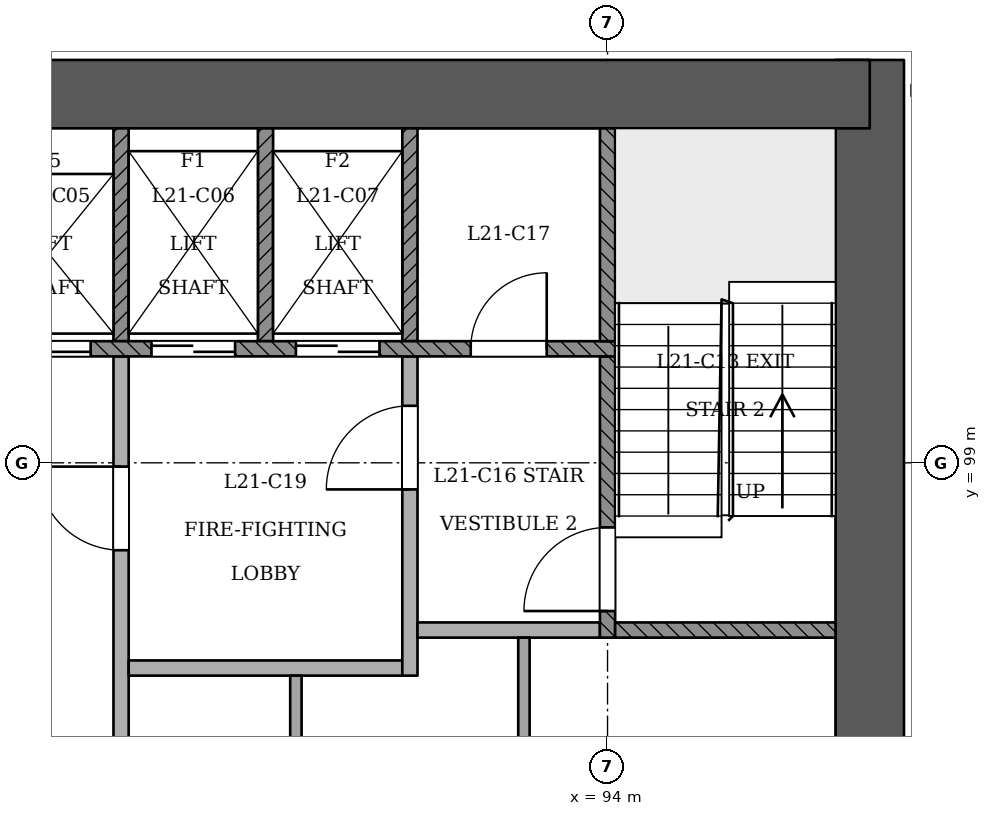
"""IFC4 building model, lengths in metres.
Left out: names, types, materials, properties, quantities, classifications, styles, units other than length and angle.
Written with IfcOpenShell. Run it as: python <this file> out.ifc"""

import sys

from ifc_helpers import new_model, si_unit, direction, frame, frame_2d, origin, place, context, subcontext, project, spatial, rectangle, extrude, element, fill, save


model = new_model("IFC4")
c1 = context("Model", 3, precision=1e-05, world=origin(), true_north=direction((0.0, 1.0)))
c2 = subcontext(c1, "Body", "Model", "MODEL_VIEW")
j1 = project(units=[si_unit("LENGTHUNIT", "METRE"), si_unit("PLANEANGLEUNIT", "RADIAN")], contexts=[c1])
p1 = place(None, origin())
s1 = spatial("IfcSite", under=j1, at=p1, CompositionType="ELEMENT")
p2 = place(p1, origin())
s2 = spatial("IfcBuilding", under=s1, at=p2, CompositionType="ELEMENT")
p3 = place(p2, frame((0.0, 0.0, 84.6)))
s3 = spatial("IfcBuildingStorey", under=s2, at=p3, CompositionType="ELEMENT", Elevation=84.6)
p4 = place(p3, frame((97.45, 92.95, 0.0), z_axis=(0.0, 0.0, 1.0), x_axis=(0.0, 1.0, 0.0)))
e1 = element("IfcWall", 1, at=p4, inside=s3, PredefinedType="SHEAR", context=c2, shape_type="SweptSolid", body=[
    extrude(rectangle(XDim=11.35, YDim=0.9, at=frame_2d((5.675, 0.0))), origin(), (0.0, 0.0, 1.0), 3.6),
])
p5 = place(p3, frame((97.45, 103.85, 0.0), z_axis=(0.0, 0.0, 1.0), x_axis=(-1.0, 0.0, 0.0)))
e2 = element("IfcWall", 2, at=p5, inside=s3, PredefinedType="SHEAR", context=c2, shape_type="SweptSolid", body=[
    extrude(rectangle(XDim=25.35, YDim=0.9, at=frame_2d((12.675, 0.0))), origin(), (0.0, 0.0, 1.0), 3.6),
])
p6 = place(p3, frame((85.631, 60.527, 0.0), z_axis=(0.0, 0.0, 1.0), x_axis=(0.500002601959, 0.866023901537, 0.0)))
e3 = element("IfcWall", 3, at=p6, inside=s3, PredefinedType="PARTITIONING", context=c2, shape_type="SweptSolid", body=[
    extrude(rectangle(XDim=41.892, YDim=0.15, at=frame_2d((20.946, 0.0))), origin(), (0.0, 0.0, 1.0), 2.7),
])
p7 = place(p6, frame((3.184, 0.0, 0.0)))
e4 = element("IfcOpeningElement", 4, at=p7, cuts=e3, PredefinedType="OPENING", context=c2, shape_type="SweptSolid", body=[
    extrude(rectangle(XDim=1.2, YDim=2.1, at=frame_2d((0.6, 1.05))), frame((0.0, 0.085, 0.0), z_axis=(0.0, -1.0, 0.0), x_axis=(1.0, 0.0, 0.0)), (0.0, 0.0, 1.0), 0.171),
])
p8 = place(p6, frame((10.688, 0.0, 0.0)))
e5 = element("IfcOpeningElement", 5, at=p8, cuts=e3, PredefinedType="OPENING", context=c2, shape_type="SweptSolid", body=[
    extrude(rectangle(XDim=1.0, YDim=2.1, at=frame_2d((0.5, 1.05))), frame((0.0, 0.085, 0.0), z_axis=(0.0, -1.0, 0.0), x_axis=(1.0, 0.0, 0.0)), (0.0, 0.0, 1.0), 0.171),
])
p9 = place(p6, frame((14.042, 0.0, 0.0)))
e6 = element("IfcOpeningElement", 6, at=p9, cuts=e3, PredefinedType="OPENING", context=c2, shape_type="SweptSolid", body=[
    extrude(rectangle(XDim=1.0, YDim=2.1, at=frame_2d((0.5, 1.05))), frame((0.0, 0.085, 0.0), z_axis=(0.0, -1.0, 0.0), x_axis=(1.0, 0.0, 0.0)), (0.0, 0.0, 1.0), 0.171),
])
p10 = place(p6, frame((19.688, 0.0, 0.0)))
e7 = element("IfcOpeningElement", 7, at=p10, cuts=e3, PredefinedType="OPENING", context=c2, shape_type="SweptSolid", body=[
    extrude(rectangle(XDim=1.0, YDim=2.1, at=frame_2d((0.5, 1.05))), frame((0.0, 0.085, 0.0), z_axis=(0.0, -1.0, 0.0), x_axis=(1.0, 0.0, 0.0)), (0.0, 0.0, 1.0), 0.171),
])
p11 = place(p6, frame((21.897, 0.0, 0.0)))
e8 = element("IfcOpeningElement", 8, at=p11, cuts=e3, PredefinedType="OPENING", context=c2, shape_type="SweptSolid", body=[
    extrude(rectangle(XDim=1.0, YDim=2.1, at=frame_2d((0.5, 1.05))), frame((0.0, 0.085, 0.0), z_axis=(0.0, -1.0, 0.0), x_axis=(1.0, 0.0, 0.0)), (0.0, 0.0, 1.0), 0.171),
])
p12 = place(p6, frame((28.572, 0.0, 0.0)))
e9 = element("IfcOpeningElement", 9, at=p12, cuts=e3, PredefinedType="OPENING", context=c2, shape_type="SweptSolid", body=[
    extrude(rectangle(XDim=1.0, YDim=2.1, at=frame_2d((0.5, 1.05))), frame((0.0, 0.085, 0.0), z_axis=(0.0, -1.0, 0.0), x_axis=(1.0, 0.0, 0.0)), (0.0, 0.0, 1.0), 0.171),
])
p13 = place(p6, frame((35.292, 0.0, 0.0)))
e10 = element("IfcOpeningElement", 10, at=p13, cuts=e3, PredefinedType="OPENING", context=c2, shape_type="SweptSolid", body=[
    extrude(rectangle(XDim=1.2, YDim=2.1, at=frame_2d((0.6, 1.05))), frame((0.0, 0.085, 0.0), z_axis=(0.0, -1.0, 0.0), x_axis=(1.0, 0.0, 0.0)), (0.0, 0.0, 1.0), 0.171),
])
p14 = place(p3, frame((99.492, 103.9, 0.0), z_axis=(0.0, 0.0, 1.0), x_axis=(-1.0, 0.0, 0.0)))
e11 = element("IfcWall", 11, at=p14, inside=s3, PredefinedType="PARTITIONING", context=c2, shape_type="SweptSolid", body=[
    extrude(rectangle(XDim=1.492, YDim=0.15, at=frame_2d((0.746, 0.0))), origin(), (0.0, 0.0, 1.0), 3.1),
])
p15 = place(p3, frame((87.6, 93.4, 0.0), z_axis=(0.0, 0.0, 1.0), x_axis=(0.0, 1.0, 0.0)))
e12 = element("IfcWall", 12, at=p15, inside=s3, PredefinedType="PARTITIONING", context=c2, shape_type="SweptSolid", body=[
    extrude(rectangle(XDim=7.0, YDim=0.2, at=frame_2d((3.5, 0.0))), origin(), (0.0, 0.0, 1.0), 3.1),
])
p16 = place(p15, frame((4.45, 0.0, 0.0)))
e13 = element("IfcOpeningElement", 13, at=p16, cuts=e12, PredefinedType="OPENING", context=c2, shape_type="SweptSolid", body=[
    extrude(rectangle(XDim=1.1, YDim=2.1, at=frame_2d((0.55, 1.05))), frame((0.0, 0.11, 0.0), z_axis=(0.0, -1.0, 0.0), x_axis=(1.0, 0.0, 0.0)), (0.0, 0.0, 1.0), 0.221),
])
p17 = place(p3, frame((89.9, 93.4, 0.0), z_axis=(0.0, 0.0, 1.0), x_axis=(0.0, 1.0, 0.0)))
e14 = element("IfcWall", 14, at=p17, inside=s3, PredefinedType="PARTITIONING", context=c2, shape_type="SweptSolid", body=[
    extrude(rectangle(XDim=2.8, YDim=0.15, at=frame_2d((1.4, 0.0))), origin(), (0.0, 0.0, 1.0), 3.1),
])
p18 = place(p3, frame((92.9, 93.4, 0.0), z_axis=(0.0, 0.0, 1.0), x_axis=(0.0, 1.0, 0.0)))
e15 = element("IfcWall", 15, at=p18, inside=s3, PredefinedType="PARTITIONING", context=c2, shape_type="SweptSolid", body=[
    extrude(rectangle(XDim=3.3, YDim=0.15, at=frame_2d((1.65, 0.0))), origin(), (0.0, 0.0, 1.0), 3.1),
])
p19 = place(p3, frame((87.7, 96.3, 0.0), z_axis=(0.0, 0.0, 1.0), x_axis=(1.0, 0.0, 0.0)))
e16 = element("IfcWall", 16, at=p19, inside=s3, PredefinedType="PARTITIONING", context=c2, shape_type="SweptSolid", body=[
    extrude(rectangle(XDim=3.6, YDim=0.2, at=frame_2d((1.8, 0.0))), origin(), (0.0, 0.0, 1.0), 3.1),
])
p20 = place(p3, frame((91.4, 96.2, 0.0), z_axis=(0.0, 0.0, 1.0), x_axis=(0.0, 1.0, 0.0)))
e17 = element("IfcWall", 17, at=p20, inside=s3, PredefinedType="PARTITIONING", context=c2, shape_type="SweptSolid", body=[
    extrude(rectangle(XDim=4.2, YDim=0.2, at=frame_2d((2.1, 0.0))), origin(), (0.0, 0.0, 1.0), 3.1),
])
p21 = place(p20, frame((2.45, 0.0, 0.0)))
e18 = element("IfcOpeningElement", 18, at=p21, cuts=e17, PredefinedType="OPENING", context=c2, shape_type="SweptSolid", body=[
    extrude(rectangle(XDim=1.1, YDim=2.1, at=frame_2d((0.55, 1.05))), frame((0.0, 0.11, 0.0), z_axis=(0.0, -1.0, 0.0), x_axis=(1.0, 0.0, 0.0)), (0.0, 0.0, 1.0), 0.221),
])
p22 = place(p3, frame((91.5, 96.8, 0.0), z_axis=(0.0, 0.0, 1.0), x_axis=(1.0, 0.0, 0.0)))
e19 = element("IfcWall", 19, at=p22, inside=s3, PredefinedType="PARTITIONING", context=c2, shape_type="SweptSolid", body=[
    extrude(rectangle(XDim=2.4, YDim=0.2, at=frame_2d((1.2, 0.0))), origin(), (0.0, 0.0, 1.0), 3.1),
])
p23 = place(p3, frame((94.0, 96.7, 0.0), z_axis=(0.0, 0.0, 1.0), x_axis=(0.0, 1.0, 0.0)))
e20 = element("IfcWall", 20, at=p23, inside=s3, PredefinedType="SOLIDWALL", context=c2, shape_type="SweptSolid", body=[
    extrude(rectangle(XDim=3.7, YDim=0.2, at=frame_2d((1.85, 0.0))), origin(), (0.0, 0.0, 1.0), 3.1),
])
p24 = place(p23, frame((0.35, 0.0, 0.0)))
e21 = element("IfcOpeningElement", 21, at=p24, cuts=e20, PredefinedType="OPENING", context=c2, shape_type="SweptSolid", body=[
    extrude(rectangle(XDim=1.1, YDim=2.1, at=frame_2d((0.55, 1.05))), frame((0.0, 0.11, 0.0), z_axis=(0.0, -1.0, 0.0), x_axis=(1.0, 0.0, 0.0)), (0.0, 0.0, 1.0), 0.221),
])
p25 = place(p3, frame((94.1, 96.8, 0.0), z_axis=(0.0, 0.0, 1.0), x_axis=(1.0, 0.0, 0.0)))
e22 = element("IfcWall", 22, at=p25, inside=s3, PredefinedType="SOLIDWALL", context=c2, shape_type="SweptSolid", body=[
    extrude(rectangle(XDim=2.9, YDim=0.2, at=frame_2d((1.45, 0.0))), origin(), (0.0, 0.0, 1.0), 3.1),
])
p26 = place(p3, frame((75.9, 100.5, 0.0), z_axis=(0.0, 0.0, 1.0), x_axis=(1.0, 0.0, 0.0)))
e23 = element("IfcWall", 23, at=p26, inside=s3, PredefinedType="SOLIDWALL", context=c2, shape_type="SweptSolid", body=[
    extrude(rectangle(XDim=18.2, YDim=0.2, at=frame_2d((9.1, 0.0))), origin(), (0.0, 0.0, 1.0), 3.1),
])
p27 = place(p26, frame((2.6, 0.0, 0.0)))
e24 = element("IfcOpeningElement", 24, at=p27, cuts=e23, PredefinedType="OPENING", context=c2, shape_type="SweptSolid", body=[
    extrude(rectangle(XDim=1.1, YDim=2.1, at=frame_2d((0.55, 1.05))), frame((0.0, 0.11, 0.0), z_axis=(0.0, -1.0, 0.0), x_axis=(1.0, 0.0, 0.0)), (0.0, 0.0, 1.0), 0.221),
])
p28 = place(p26, frame((4.5, 0.0, 0.0)))
e25 = element("IfcOpeningElement", 25, at=p28, cuts=e23, PredefinedType="OPENING", context=c2, shape_type="SweptSolid", body=[
    extrude(rectangle(XDim=1.1, YDim=2.1, at=frame_2d((0.55, 1.05))), frame((0.0, 0.11, 0.0), z_axis=(0.0, -1.0, 0.0), x_axis=(1.0, 0.0, 0.0)), (0.0, 0.0, 1.0), 0.221),
])
p29 = place(p26, frame((6.4, 0.0, 0.0)))
e26 = element("IfcOpeningElement", 26, at=p29, cuts=e23, PredefinedType="OPENING", context=c2, shape_type="SweptSolid", body=[
    extrude(rectangle(XDim=1.1, YDim=2.1, at=frame_2d((0.55, 1.05))), frame((0.0, 0.11, 0.0), z_axis=(0.0, -1.0, 0.0), x_axis=(1.0, 0.0, 0.0)), (0.0, 0.0, 1.0), 0.221),
])
p30 = place(p26, frame((8.3, 0.0, 0.0)))
e27 = element("IfcOpeningElement", 27, at=p30, cuts=e23, PredefinedType="OPENING", context=c2, shape_type="SweptSolid", body=[
    extrude(rectangle(XDim=1.1, YDim=2.1, at=frame_2d((0.55, 1.05))), frame((0.0, 0.11, 0.0), z_axis=(0.0, -1.0, 0.0), x_axis=(1.0, 0.0, 0.0)), (0.0, 0.0, 1.0), 0.221),
])
p31 = place(p26, frame((10.2, 0.0, 0.0)))
e28 = element("IfcOpeningElement", 28, at=p31, cuts=e23, PredefinedType="OPENING", context=c2, shape_type="SweptSolid", body=[
    extrude(rectangle(XDim=1.1, YDim=2.1, at=frame_2d((0.55, 1.05))), frame((0.0, 0.11, 0.0), z_axis=(0.0, -1.0, 0.0), x_axis=(1.0, 0.0, 0.0)), (0.0, 0.0, 1.0), 0.221),
])
p32 = place(p26, frame((12.1, 0.0, 0.0)))
e29 = element("IfcOpeningElement", 29, at=p32, cuts=e23, PredefinedType="OPENING", context=c2, shape_type="SweptSolid", body=[
    extrude(rectangle(XDim=1.1, YDim=2.1, at=frame_2d((0.55, 1.05))), frame((0.0, 0.11, 0.0), z_axis=(0.0, -1.0, 0.0), x_axis=(1.0, 0.0, 0.0)), (0.0, 0.0, 1.0), 0.221),
])
p33 = place(p26, frame((14.0, 0.0, 0.0)))
e30 = element("IfcOpeningElement", 30, at=p33, cuts=e23, PredefinedType="OPENING", context=c2, shape_type="SweptSolid", body=[
    extrude(rectangle(XDim=1.1, YDim=2.1, at=frame_2d((0.55, 1.05))), frame((0.0, 0.11, 0.0), z_axis=(0.0, -1.0, 0.0), x_axis=(1.0, 0.0, 0.0)), (0.0, 0.0, 1.0), 0.221),
])
p34 = place(p26, frame((0.65, 0.0, 0.0)))
e31 = element("IfcOpeningElement", 31, at=p34, cuts=e23, PredefinedType="OPENING", context=c2, shape_type="SweptSolid", body=[
    extrude(rectangle(XDim=1.0, YDim=2.1, at=frame_2d((0.5, 1.05))), frame((0.0, 0.11, 0.0), z_axis=(0.0, -1.0, 0.0), x_axis=(1.0, 0.0, 0.0)), (0.0, 0.0, 1.0), 0.221),
])
p35 = place(p26, frame((16.3, 0.0, 0.0)))
e32 = element("IfcOpeningElement", 32, at=p35, cuts=e23, PredefinedType="OPENING", context=c2, shape_type="SweptSolid", body=[
    extrude(rectangle(XDim=1.0, YDim=2.1, at=frame_2d((0.5, 1.05))), frame((0.0, 0.11, 0.0), z_axis=(0.0, -1.0, 0.0), x_axis=(1.0, 0.0, 0.0)), (0.0, 0.0, 1.0), 0.221),
])
for number, where, z_axis, x_axis in (
    (33, (87.6, 100.6, 0.0), (0.0, 0.0, 1.0), (0.0, 1.0, 0.0)),
    (34, (89.5, 100.6, 0.0), (0.0, 0.0, 1.0), (0.0, 1.0, 0.0)),
    (35, (91.4, 100.6, 0.0), (0.0, 0.0, 1.0), (0.0, 1.0, 0.0)),
    (36, (94.0, 100.6, 0.0), (0.0, 0.0, 1.0), (0.0, 1.0, 0.0)),
):
    element("IfcWall", number, at=place(p3, frame(where, z_axis=z_axis, x_axis=x_axis)), inside=s3, PredefinedType="SOLIDWALL", context=c2, shape_type="SweptSolid", body=[
        extrude(rectangle(XDim=2.8, YDim=0.2, at=frame_2d((1.4, 0.0))), origin(), (0.0, 0.0, 1.0), 3.1),
    ])
p36 = place(p31, origin())
e37 = element("IfcDoor", 37, at=p36, inside=s3, OperationType="SLIDING_TO_RIGHT", PredefinedType="NOTDEFINED", context=c2, shape_type="SweptSolid", body=[
    extrude(rectangle(XDim=1.1, YDim=2.1, at=frame_2d((0.55, 1.05))), frame((0.0, 0.025, 0.0), z_axis=(0.0, -1.0, 0.0), x_axis=(1.0, 0.0, 0.0)), (0.0, 0.0, 1.0), 0.05),
])
fill(e28, e37)
p37 = place(p32, origin())
e38 = element("IfcDoor", 38, at=p37, inside=s3, OperationType="SLIDING_TO_RIGHT", PredefinedType="NOTDEFINED", context=c2, shape_type="SweptSolid", body=[
    extrude(rectangle(XDim=1.1, YDim=2.1, at=frame_2d((0.55, 1.05))), frame((0.0, 0.025, 0.0), z_axis=(0.0, -1.0, 0.0), x_axis=(1.0, 0.0, 0.0)), (0.0, 0.0, 1.0), 0.05),
])
fill(e29, e38)
p38 = place(p33, origin())
e39 = element("IfcDoor", 39, at=p38, inside=s3, OperationType="SLIDING_TO_LEFT", PredefinedType="NOTDEFINED", context=c2, shape_type="SweptSolid", body=[
    extrude(rectangle(XDim=1.1, YDim=2.1, at=frame_2d((0.55, 1.05))), frame((0.0, 0.025, 0.0), z_axis=(0.0, -1.0, 0.0), x_axis=(1.0, 0.0, 0.0)), (0.0, 0.0, 1.0), 0.05),
])
fill(e30, e39)
p39 = place(p24, origin())
e40 = element("IfcDoor", 40, at=p39, inside=s3, OperationType="SINGLE_SWING_LEFT", PredefinedType="NOTDEFINED", context=c2, shape_type="SweptSolid", body=[
    extrude(rectangle(XDim=1.1, YDim=2.1, at=frame_2d((0.55, 1.05))), frame((0.0, 0.025, 0.0), z_axis=(0.0, -1.0, 0.0), x_axis=(1.0, 0.0, 0.0)), (0.0, 0.0, 1.0), 0.05),
])
fill(e21, e40)
p40 = place(p16, origin())
e41 = element("IfcDoor", 41, at=p40, inside=s3, OperationType="SINGLE_SWING_RIGHT", PredefinedType="NOTDEFINED", context=c2, shape_type="SweptSolid", body=[
    extrude(rectangle(XDim=1.1, YDim=2.1, at=frame_2d((0.55, 1.05))), frame((0.0, 0.025, 0.0), z_axis=(0.0, -1.0, 0.0), x_axis=(1.0, 0.0, 0.0)), (0.0, 0.0, 1.0), 0.05),
])
fill(e13, e41)
p41 = place(p21, origin())
e42 = element("IfcDoor", 42, at=p41, inside=s3, OperationType="SINGLE_SWING_LEFT", PredefinedType="NOTDEFINED", context=c2, shape_type="SweptSolid", body=[
    extrude(rectangle(XDim=1.1, YDim=2.1, at=frame_2d((0.55, 1.05))), frame((0.0, 0.025, 0.0), z_axis=(0.0, -1.0, 0.0), x_axis=(1.0, 0.0, 0.0)), (0.0, 0.0, 1.0), 0.05),
])
fill(e18, e42)
p42 = place(p35, origin())
e43 = element("IfcDoor", 43, at=p42, inside=s3, OperationType="SINGLE_SWING_RIGHT", PredefinedType="NOTDEFINED", context=c2, shape_type="SweptSolid", body=[
    extrude(rectangle(XDim=1.0, YDim=2.1, at=frame_2d((0.5, 1.05))), frame((0.0, 0.025, 0.0), z_axis=(0.0, -1.0, 0.0), x_axis=(1.0, 0.0, 0.0)), (0.0, 0.0, 1.0), 0.05),
])
fill(e32, e43)
save(model, sys.argv[1])
